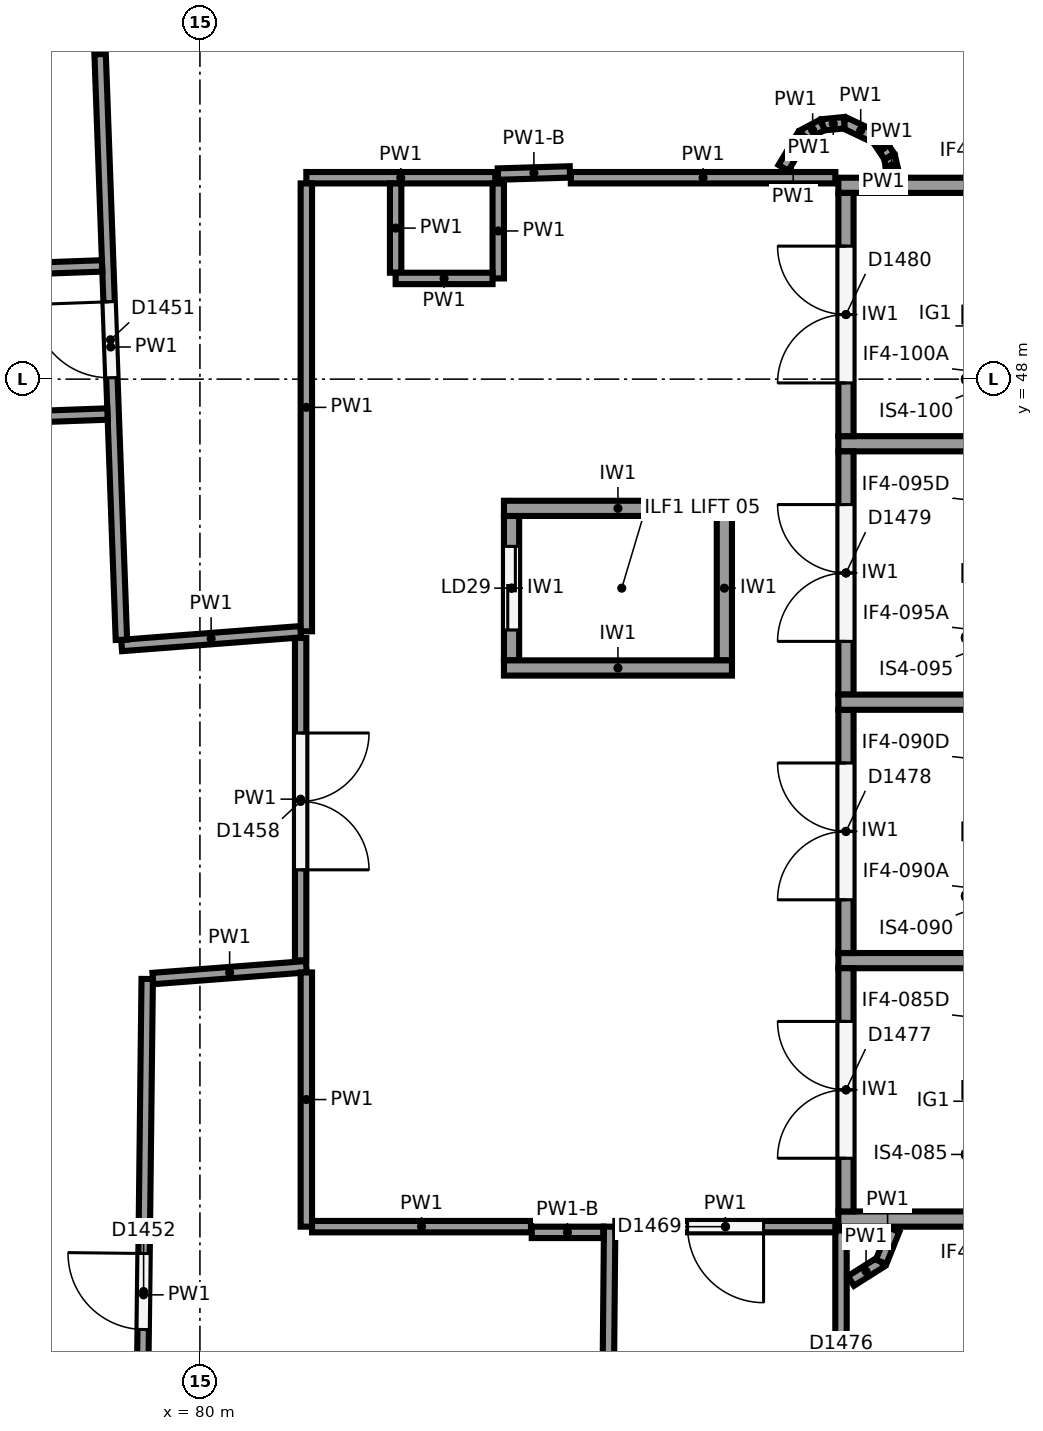
"""IFC4 building model, lengths in metres.
Left out: names, types, materials, properties, quantities, classifications, styles, units other than length and angle.
Written with IfcOpenShell. Run it as: python <this file> out.ifc"""

import sys

from ifc_helpers import new_model, si_unit, direction, frame, frame_2d, origin, origin_2d, place, context, subcontext, project, spatial, rectangle, circle, extrude, element, fill, save


model = new_model("IFC4")
c1 = context("Model", 3, precision=1e-05, world=origin(), true_north=direction((0.0, 1.0)))
c2 = subcontext(c1, "Body", "Model", "MODEL_VIEW")
j1 = project(units=[si_unit("LENGTHUNIT", "METRE"), si_unit("PLANEANGLEUNIT", "RADIAN")], contexts=[c1])
p1 = place(None, origin())
s1 = spatial("IfcSite", under=j1, at=p1, CompositionType="ELEMENT")
p2 = place(p1, origin())
s2 = spatial("IfcBuilding", under=s1, at=p2, CompositionType="ELEMENT")
p3 = place(p2, frame((0.0, 0.0, 18.0)))
s3 = spatial("IfcBuildingStorey", under=s2, at=p3, CompositionType="ELEMENT", Elevation=18.0)
p4 = place(p3, frame((84.884, 42.562, 0.0), z_axis=(0.0, 0.0, 1.0), x_axis=(1.0, 0.0, 0.0)))
e1 = element("IfcColumn", 1, at=p4, inside=s3, PredefinedType="COLUMN", context=c2, shape_type="SweptSolid", body=[
    extrude(circle(Radius=0.6, at=origin_2d()), origin(), (0.0, 0.0, 1.0), 6.0),
])
for number, where, z_axis, x_axis in (
    (2, (97.2, 36.95, 0.0), (0.0, 0.0, 1.0), (-1.0, 0.0, 0.0)),
    (3, (97.2, 43.75, 0.0), (0.0, 0.0, 1.0), (-1.0, 0.0, 0.0)),
    (4, (97.2, 50.55, 0.0), (0.0, 0.0, 1.0), (-1.0, 0.0, 0.0)),
    (5, (97.2, 40.35, 0.0), (0.0, 0.0, 1.0), (-1.0, 0.0, 0.0)),
    (6, (97.2, 47.15, 0.0), (0.0, 0.0, 1.0), (-1.0, 0.0, 0.0)),
):
    element("IfcWall", number, at=place(p3, frame(where, z_axis=z_axis, x_axis=x_axis)), inside=s3, PredefinedType="SHEAR", context=c2, shape_type="SweptSolid", body=[
        extrude(rectangle(XDim=8.8, YDim=0.2, at=frame_2d((4.4, 0.0))), origin(), (0.0, 0.0, 1.0), 5.6),
    ])
p5 = place(p3, frame((88.5, 37.05, 0.0), z_axis=(0.0, 0.0, 1.0), x_axis=(0.0, 1.0, 0.0)))
e7 = element("IfcWall", 7, at=p5, inside=s3, PredefinedType="SHEAR", context=c2, shape_type="SweptSolid", body=[
    extrude(rectangle(XDim=3.2, YDim=0.2, at=frame_2d((1.6, 0.0))), origin(), (0.0, 0.0, 1.0), 5.6),
])
p6 = place(p5, frame((0.7, 0.0, 0.0)))
e8 = element("IfcOpeningElement", 8, at=p6, cuts=e7, PredefinedType="OPENING", context=c2, shape_type="SweptSolid", body=[
    extrude(rectangle(XDim=1.8, YDim=2.1, at=frame_2d((0.9, 1.05))), frame((0.0, 0.11, 0.0), z_axis=(0.0, -1.0, 0.0), x_axis=(1.0, 0.0, 0.0)), (0.0, 0.0, 1.0), 0.22),
])
p7 = place(p3, frame((88.5, 40.45, 0.0), z_axis=(0.0, 0.0, 1.0), x_axis=(0.0, 1.0, 0.0)))
e9 = element("IfcWall", 9, at=p7, inside=s3, PredefinedType="SHEAR", context=c2, shape_type="SweptSolid", body=[
    extrude(rectangle(XDim=3.2, YDim=0.2, at=frame_2d((1.6, 0.0))), origin(), (0.0, 0.0, 1.0), 5.6),
])
p8 = place(p7, frame((0.7, 0.0, 0.0)))
e10 = element("IfcOpeningElement", 10, at=p8, cuts=e9, PredefinedType="OPENING", context=c2, shape_type="SweptSolid", body=[
    extrude(rectangle(XDim=1.8, YDim=2.1, at=frame_2d((0.9, 1.05))), frame((0.0, 0.11, 0.0), z_axis=(0.0, -1.0, 0.0), x_axis=(1.0, 0.0, 0.0)), (0.0, 0.0, 1.0), 0.22),
])
p9 = place(p3, frame((88.5, 43.85, 0.0), z_axis=(0.0, 0.0, 1.0), x_axis=(0.0, 1.0, 0.0)))
e11 = element("IfcWall", 11, at=p9, inside=s3, PredefinedType="SHEAR", context=c2, shape_type="SweptSolid", body=[
    extrude(rectangle(XDim=3.2, YDim=0.2, at=frame_2d((1.6, 0.0))), origin(), (0.0, 0.0, 1.0), 5.6),
])
p10 = place(p9, frame((0.7, 0.0, 0.0)))
e12 = element("IfcOpeningElement", 12, at=p10, cuts=e11, PredefinedType="OPENING", context=c2, shape_type="SweptSolid", body=[
    extrude(rectangle(XDim=1.8, YDim=2.1, at=frame_2d((0.9, 1.05))), frame((0.0, 0.11, 0.0), z_axis=(0.0, -1.0, 0.0), x_axis=(1.0, 0.0, 0.0)), (0.0, 0.0, 1.0), 0.22),
])
p11 = place(p3, frame((88.5, 47.25, 0.0), z_axis=(0.0, 0.0, 1.0), x_axis=(0.0, 1.0, 0.0)))
e13 = element("IfcWall", 13, at=p11, inside=s3, PredefinedType="SHEAR", context=c2, shape_type="SweptSolid", body=[
    extrude(rectangle(XDim=3.2, YDim=0.2, at=frame_2d((1.6, 0.0))), origin(), (0.0, 0.0, 1.0), 5.6),
])
p12 = place(p11, frame((0.7, 0.0, 0.0)))
e14 = element("IfcOpeningElement", 14, at=p12, cuts=e13, PredefinedType="OPENING", context=c2, shape_type="SweptSolid", body=[
    extrude(rectangle(XDim=1.8, YDim=2.1, at=frame_2d((0.9, 1.05))), frame((0.0, 0.11, 0.0), z_axis=(0.0, -1.0, 0.0), x_axis=(1.0, 0.0, 0.0)), (0.0, 0.0, 1.0), 0.22),
])
for number, where, z_axis, x_axis in (
    (15, (87.0, 44.2, 0.0), (0.0, 0.0, 1.0), (-1.0, 0.0, 0.0)),
    (16, (87.0, 46.3, 0.0), (0.0, 0.0, 1.0), (-1.0, 0.0, 0.0)),
):
    element("IfcWall", number, at=place(p3, frame(where, z_axis=z_axis, x_axis=x_axis)), inside=s3, PredefinedType="SHEAR", context=c2, shape_type="SweptSolid", body=[
        extrude(rectangle(XDim=3.0, YDim=0.2, at=frame_2d((1.5, 0.0))), origin(), (0.0, 0.0, 1.0), 5.6),
    ])
p13 = place(p3, frame((86.9, 44.3, 0.0), z_axis=(0.0, 0.0, 1.0), x_axis=(0.0, 1.0, 0.0)))
e17 = element("IfcWall", 17, at=p13, inside=s3, PredefinedType="SHEAR", context=c2, shape_type="SweptSolid", body=[
    extrude(rectangle(XDim=1.9, YDim=0.2, at=frame_2d((0.95, 0.0))), origin(), (0.0, 0.0, 1.0), 5.6),
])
p14 = place(p3, frame((84.1, 44.3, 0.0), z_axis=(0.0, 0.0, 1.0), x_axis=(0.0, 1.0, 0.0)))
e18 = element("IfcWall", 18, at=p14, inside=s3, PredefinedType="SHEAR", context=c2, shape_type="SweptSolid", body=[
    extrude(rectangle(XDim=1.9, YDim=0.2, at=frame_2d((0.95, 0.0))), origin(), (0.0, 0.0, 1.0), 5.6),
])
p15 = place(p14, frame((0.4, 0.0, 0.0)))
e19 = element("IfcOpeningElement", 19, at=p15, cuts=e18, PredefinedType="OPENING", context=c2, shape_type="SweptSolid", body=[
    extrude(rectangle(XDim=1.1, YDim=2.1, at=frame_2d((0.55, 1.05))), frame((0.0, 0.11, 0.0), z_axis=(0.0, -1.0, 0.0), x_axis=(1.0, 0.0, 0.0)), (0.0, 0.0, 1.0), 0.22),
])
p16 = place(p3, frame((88.435, 32.303, 0.0), z_axis=(0.0, 0.0, 1.0), x_axis=(0.0, 1.0, 0.0)))
e20 = element("IfcWall", 20, at=p16, inside=s3, PredefinedType="PARTITIONING", context=c2, shape_type="SweptSolid", body=[
    extrude(rectangle(XDim=4.497, YDim=0.15, at=frame_2d((2.249, 0.0))), origin(), (0.0, 0.0, 1.0), 5.6),
])
p17 = place(p16, frame((1.7, 0.0, 0.0)))
e21 = element("IfcOpeningElement", 21, at=p17, cuts=e20, PredefinedType="OPENING", context=c2, shape_type="SweptSolid", body=[
    extrude(rectangle(XDim=1.0, YDim=2.1, at=frame_2d((0.5, 1.05))), frame((0.0, 0.085, 0.0), z_axis=(0.0, -1.0, 0.0), x_axis=(1.0, 0.0, 0.0)), (0.0, 0.0, 1.0), 0.17),
])
p18 = place(p3, frame((85.346, 32.134, 0.0), z_axis=(0.0, 0.0, 1.0), x_axis=(0.009420359449, 0.999955627429, 0.0)))
e22 = element("IfcWall", 22, at=p18, inside=s3, PredefinedType="PARTITIONING", context=c2, shape_type="SweptSolid", body=[
    extrude(rectangle(XDim=4.717, YDim=0.15, at=frame_2d((2.358, 0.0))), origin(), (0.0, 0.0, 1.0), 5.6),
])
p19 = place(p3, frame((85.466, 36.85, 0.0), z_axis=(0.0, 0.0, 1.0), x_axis=(1.0, 0.0, 0.0)))
e23 = element("IfcWall", 23, at=p19, inside=s3, PredefinedType="PARTITIONING", context=c2, shape_type="SweptSolid", body=[
    extrude(rectangle(XDim=2.894, YDim=0.15, at=frame_2d((1.447, 0.0))), origin(), (0.0, 0.0, 1.0), 5.6),
])
p20 = place(p19, frame((0.95, 0.0, 0.0)))
e24 = element("IfcOpeningElement", 24, at=p20, cuts=e23, PredefinedType="OPENING", context=c2, shape_type="SweptSolid", body=[
    extrude(rectangle(XDim=1.0, YDim=2.1, at=frame_2d((0.5, 1.05))), frame((0.0, 0.085, 0.0), z_axis=(0.0, -1.0, 0.0), x_axis=(1.0, 0.0, 0.0)), (0.0, 0.0, 1.0), 0.17),
])
p21 = place(p3, frame((79.211, 31.797, 0.0), z_axis=(0.0, 0.0, 1.0), x_axis=(0.011484716768, 0.999934048466, 0.0)))
e25 = element("IfcWall", 25, at=p21, inside=s3, PredefinedType="PARTITIONING", context=c2, shape_type="SweptSolid", body=[
    extrude(rectangle(XDim=8.312, YDim=0.15, at=frame_2d((4.156, 0.0))), origin(), (0.0, 0.0, 1.0), 5.6),
])
p22 = place(p21, frame((3.7, 0.0, 0.0)))
e26 = element("IfcOpeningElement", 26, at=p22, cuts=e25, PredefinedType="OPENING", context=c2, shape_type="SweptSolid", body=[
    extrude(rectangle(XDim=1.0, YDim=2.1, at=frame_2d((0.5, 1.05))), frame((0.0, 0.085, 0.0), z_axis=(0.0, -1.0, 0.0), x_axis=(1.0, 0.0, 0.0)), (0.0, 0.0, 1.0), 0.17),
])
p23 = place(p3, frame((79.381, 40.115, 0.0), z_axis=(0.0, 0.0, 1.0), x_axis=(0.997072900492, 0.076456727009, 0.0)))
e27 = element("IfcWall", 27, at=p23, inside=s3, PredefinedType="PARTITIONING", context=c2, shape_type="SweptSolid", body=[
    extrude(rectangle(XDim=2.024, YDim=0.15, at=frame_2d((1.012, 0.0))), origin(), (0.0, 0.0, 1.0), 5.6),
])
p24 = place(p3, frame((81.4, 40.194, 0.0), z_axis=(0.0, 0.0, 1.0), x_axis=(0.0, -1.0, 0.0)))
e28 = element("IfcWall", 28, at=p24, inside=s3, PredefinedType="PARTITIONING", context=c2, shape_type="SweptSolid", body=[
    extrude(rectangle(XDim=3.344, YDim=0.15, at=frame_2d((1.672, 0.0))), origin(), (0.0, 0.0, 1.0), 5.6),
])
p25 = place(p3, frame((81.475, 36.85, 0.0), z_axis=(0.0, 0.0, 1.0), x_axis=(1.0, 0.0, 0.0)))
e29 = element("IfcWall", 29, at=p25, inside=s3, PredefinedType="PARTITIONING", context=c2, shape_type="SweptSolid", body=[
    extrude(rectangle(XDim=2.881, YDim=0.15, at=frame_2d((1.44, 0.0))), origin(), (0.0, 0.0, 1.0), 5.6),
])
p26 = place(p3, frame((88.36, 50.65, 0.0), z_axis=(0.0, 0.0, 1.0), x_axis=(-1.0, 0.0, 0.0)))
e30 = element("IfcWall", 30, at=p26, inside=s3, PredefinedType="PARTITIONING", context=c2, shape_type="SweptSolid", body=[
    extrude(rectangle(XDim=3.48, YDim=0.15, at=frame_2d((1.74, 0.0))), origin(), (0.0, 0.0, 1.0), 5.6),
])
p27 = place(p3, frame((83.886, 50.65, 0.0), z_axis=(0.0, 0.0, 1.0), x_axis=(-1.0, 0.0, 0.0)))
e31 = element("IfcWall", 31, at=p27, inside=s3, PredefinedType="PARTITIONING", context=c2, shape_type="SweptSolid", body=[
    extrude(rectangle(XDim=2.486, YDim=0.15, at=frame_2d((1.243, 0.0))), origin(), (0.0, 0.0, 1.0), 5.6),
])
p28 = place(p3, frame((81.4, 50.575, 0.0), z_axis=(0.0, 0.0, 1.0), x_axis=(0.0, -1.0, 0.0)))
e32 = element("IfcWall", 32, at=p28, inside=s3, PredefinedType="PARTITIONING", context=c2, shape_type="SweptSolid", body=[
    extrude(rectangle(XDim=5.893, YDim=0.15, at=frame_2d((2.946, 0.0))), origin(), (0.0, 0.0, 1.0), 5.6),
])
p29 = place(p3, frame((81.325, 44.677, 0.0), z_axis=(0.0, 0.0, 1.0), x_axis=(-0.997071482458, -0.076475217353, 0.0)))
e33 = element("IfcWall", 33, at=p29, inside=s3, PredefinedType="PARTITIONING", context=c2, shape_type="SweptSolid", body=[
    extrude(rectangle(XDim=2.362, YDim=0.15, at=frame_2d((1.181, 0.0))), origin(), (0.0, 0.0, 1.0), 5.6),
])
p30 = place(p3, frame((78.967, 44.571, 0.0), z_axis=(0.0, 0.0, 1.0), x_axis=(-0.036322942596, 0.999340104189, 0.0)))
e34 = element("IfcWall", 34, at=p30, inside=s3, PredefinedType="PARTITIONING", context=c2, shape_type="SweptSolid", body=[
    extrude(rectangle(XDim=7.709, YDim=0.15, at=frame_2d((3.855, 0.0))), origin(), (0.0, 0.0, 1.0), 5.6),
])
p31 = place(p30, frame((3.45, 0.0, 0.0)))
e35 = element("IfcOpeningElement", 35, at=p31, cuts=e34, PredefinedType="OPENING", context=c2, shape_type="SweptSolid", body=[
    extrude(rectangle(XDim=1.0, YDim=2.1, at=frame_2d((0.5, 1.05))), frame((0.0, 0.085, 0.0), z_axis=(0.0, -1.0, 0.0), x_axis=(1.0, 0.0, 0.0)), (0.0, 0.0, 1.0), 0.17),
])
p32 = place(p3, frame((83.925, 49.325, 0.0), z_axis=(0.0, 0.0, 1.0), x_axis=(0.0, 1.0, 0.0)))
e36 = element("IfcWall", 36, at=p32, inside=s3, PredefinedType="PARTITIONING", context=c2, shape_type="SweptSolid", body=[
    extrude(rectangle(XDim=1.249, YDim=0.15, at=frame_2d((0.625, 0.0))), origin(), (0.0, 0.0, 1.0), 5.6),
])
p33 = place(p3, frame((82.575, 50.574, 0.0), z_axis=(0.0, 0.0, 1.0), x_axis=(0.0, -1.0, 0.0)))
e37 = element("IfcWall", 37, at=p33, inside=s3, PredefinedType="PARTITIONING", context=c2, shape_type="SweptSolid", body=[
    extrude(rectangle(XDim=1.174, YDim=0.15, at=frame_2d((0.587, 0.0))), origin(), (0.0, 0.0, 1.0), 5.6),
])
p34 = place(p3, frame((82.575, 49.325, 0.0), z_axis=(0.0, 0.0, 1.0), x_axis=(1.0, 0.0, 0.0)))
e38 = element("IfcWall", 38, at=p34, inside=s3, PredefinedType="PARTITIONING", context=c2, shape_type="SweptSolid", body=[
    extrude(rectangle(XDim=1.275, YDim=0.15, at=frame_2d((0.638, 0.0))), origin(), (0.0, 0.0, 1.0), 5.6),
])
p35 = place(p3, frame((81.325, 44.594, 0.0), z_axis=(0.0, 0.0, 1.0), x_axis=(0.0, -1.0, 0.0)))
e39 = element("IfcWall", 39, at=p35, inside=s3, PredefinedType="PARTITIONING", context=c2, shape_type="SweptSolid", body=[
    extrude(rectangle(XDim=4.241, YDim=0.15, at=frame_2d((2.12, 0.0))), origin(), (0.0, 0.0, 1.0), 5.6),
])
p36 = place(p35, frame((1.25, 0.0, 0.0)))
e40 = element("IfcOpeningElement", 40, at=p36, cuts=e39, PredefinedType="OPENING", context=c2, shape_type="SweptSolid", body=[
    extrude(rectangle(XDim=1.8, YDim=2.1, at=frame_2d((0.9, 1.05))), frame((0.0, 0.085, 0.0), z_axis=(0.0, -1.0, 0.0), x_axis=(1.0, 0.0, 0.0)), (0.0, 0.0, 1.0), 0.17),
])
p37 = place(p3, frame((84.366, 36.775, 0.0), z_axis=(0.0, 0.0, 1.0), x_axis=(1.0, 0.0, 0.0)))
e41 = element("IfcWall", 41, at=p37, inside=s3, PredefinedType="PARTITIONING", context=c2, shape_type="SweptSolid", body=[
    extrude(rectangle(XDim=0.94, YDim=0.15, at=frame_2d((0.47, 0.0))), origin(), (0.0, 0.0, 1.0), 4.5),
])
p38 = place(p3, frame((88.566, 36.136, 0.0), z_axis=(0.0, 0.0, 1.0), x_axis=(0.845155463404, 0.534520572737, 0.0)))
e42 = element("IfcWall", 42, at=p38, inside=s3, PredefinedType="PARTITIONING", context=c2, shape_type="SweptSolid", body=[
    extrude(rectangle(XDim=0.47, YDim=0.15, at=frame_2d((0.235, 0.0))), origin(), (0.0, 0.0, 1.0), 5.6),
])
p39 = place(p3, frame((88.963, 36.387, 0.0), z_axis=(0.0, 0.0, 1.0), x_axis=(0.371761148228, 0.928328416385, 0.0)))
e43 = element("IfcWall", 43, at=p39, inside=s3, PredefinedType="PARTITIONING", context=c2, shape_type="SweptSolid", body=[
    extrude(rectangle(XDim=0.454, YDim=0.15, at=frame_2d((0.227, 0.0))), origin(), (0.0, 0.0, 1.0), 5.6),
])
p40 = place(p3, frame((89.13, 50.678, 0.0), z_axis=(0.0, 0.0, 1.0), x_axis=(-0.231150896285, 0.972917911823, 0.0)))
e44 = element("IfcWall", 44, at=p40, inside=s3, PredefinedType="PARTITIONING", context=c2, shape_type="SweptSolid", body=[
    extrude(rectangle(XDim=0.258, YDim=0.15, at=frame_2d((0.129, 0.0))), origin(), (0.0, 0.0, 1.0), 5.6),
])
p41 = place(p3, frame((89.07, 50.929, 0.0), z_axis=(0.0, 0.0, 1.0), x_axis=(-0.555678694372, 0.831397130511, 0.0)))
e45 = element("IfcWall", 45, at=p41, inside=s3, PredefinedType="PARTITIONING", context=c2, shape_type="SweptSolid", body=[
    extrude(rectangle(XDim=0.288, YDim=0.15, at=frame_2d((0.144, 0.0))), origin(), (0.0, 0.0, 1.0), 5.6),
])
p42 = place(p3, frame((88.91, 51.168, 0.0), z_axis=(0.0, 0.0, 1.0), x_axis=(-0.903893315025, 0.427757963167, 0.0)))
e46 = element("IfcWall", 46, at=p42, inside=s3, PredefinedType="PARTITIONING", context=c2, shape_type="SweptSolid", body=[
    extrude(rectangle(XDim=0.479, YDim=0.15, at=frame_2d((0.24, 0.0))), origin(), (0.0, 0.0, 1.0), 5.6),
])
for number, where, z_axis, x_axis in (
    (47, (88.477, 51.374, 0.0), (0.0, 0.0, 1.0), (-0.995, -0.098, 0.0)),
    (48, (88.189, 51.345, 0.0), (0.0, 0.0, 1.0), (-0.882, -0.472, 0.0)),
):
    element("IfcWall", number, at=place(p3, frame(where, z_axis=z_axis, x_axis=x_axis)), inside=s3, PredefinedType="PARTITIONING", context=c2, shape_type="SweptSolid", body=[
        extrude(rectangle(XDim=0.289, YDim=0.15, at=frame_2d((0.145, 0.0))), origin(), (0.0, 0.0, 1.0), 5.6),
    ])
p43 = place(p3, frame((87.934, 51.209, 0.0), z_axis=(0.0, 0.0, 1.0), x_axis=(-0.513060623194, -0.858352373404, 0.0)))
e49 = element("IfcWall", 49, at=p43, inside=s3, PredefinedType="PARTITIONING", context=c2, shape_type="SweptSolid", body=[
    extrude(rectangle(XDim=0.5, YDim=0.15, at=frame_2d((0.25, 0.0))), origin(), (0.0, 0.0, 1.0), 5.6),
])
p44 = place(p3, frame((84.868, 50.726, 0.0), z_axis=(0.0, 0.0, 1.0), x_axis=(-0.999545658695, -0.030140938677, 0.0)))
e50 = element("IfcWall", 50, at=p44, inside=s3, PredefinedType="PARTITIONING", context=c2, shape_type="SweptSolid", body=[
    extrude(rectangle(XDim=0.948, YDim=0.15, at=frame_2d((0.474, 0.0))), origin(), (0.0, 0.0, 1.0), 4.5),
])
p45 = place(p3, frame((78.784, 47.541, 0.0), z_axis=(0.0, 0.0, 1.0), x_axis=(-0.999343075339, -0.036241106098, 0.0)))
e51 = element("IfcWall", 51, at=p45, inside=s3, PredefinedType="PARTITIONING", context=c2, shape_type="SweptSolid", body=[
    extrude(rectangle(XDim=2.25, YDim=0.15, at=frame_2d((1.125, 0.0))), origin(), (0.0, 0.0, 1.0), 5.618),
])
p46 = place(p3, frame((78.713, 49.49, 0.0), z_axis=(0.0, 0.0, 1.0), x_axis=(-0.999343075339, -0.036241106098, 0.0)))
e52 = element("IfcWall", 52, at=p46, inside=s3, PredefinedType="PARTITIONING", context=c2, shape_type="SweptSolid", body=[
    extrude(rectangle(XDim=2.25, YDim=0.15, at=frame_2d((1.125, 0.0))), origin(), (0.0, 0.0, 1.0), 5.716),
])
p47 = place(p6, origin())
e53 = element("IfcDoor", 53, at=p47, inside=s3, OperationType="DOUBLE_DOOR_SINGLE_SWING", PredefinedType="DOOR", context=c2, shape_type="SweptSolid", body=[
    extrude(rectangle(XDim=1.8, YDim=2.1, at=frame_2d((0.9, 1.05))), frame((0.0, 0.025, 0.0), z_axis=(0.0, -1.0, 0.0), x_axis=(1.0, 0.0, 0.0)), (0.0, 0.0, 1.0), 0.05),
])
fill(e8, e53)
p48 = place(p8, origin())
e54 = element("IfcDoor", 54, at=p48, inside=s3, OperationType="DOUBLE_DOOR_SINGLE_SWING", PredefinedType="DOOR", context=c2, shape_type="SweptSolid", body=[
    extrude(rectangle(XDim=1.8, YDim=2.1, at=frame_2d((0.9, 1.05))), frame((0.0, 0.025, 0.0), z_axis=(0.0, -1.0, 0.0), x_axis=(1.0, 0.0, 0.0)), (0.0, 0.0, 1.0), 0.05),
])
fill(e10, e54)
p49 = place(p10, origin())
e55 = element("IfcDoor", 55, at=p49, inside=s3, OperationType="DOUBLE_DOOR_SINGLE_SWING", PredefinedType="DOOR", context=c2, shape_type="SweptSolid", body=[
    extrude(rectangle(XDim=1.8, YDim=2.1, at=frame_2d((0.9, 1.05))), frame((0.0, 0.025, 0.0), z_axis=(0.0, -1.0, 0.0), x_axis=(1.0, 0.0, 0.0)), (0.0, 0.0, 1.0), 0.05),
])
fill(e12, e55)
p50 = place(p12, origin())
e56 = element("IfcDoor", 56, at=p50, inside=s3, OperationType="DOUBLE_DOOR_SINGLE_SWING", PredefinedType="DOOR", context=c2, shape_type="SweptSolid", body=[
    extrude(rectangle(XDim=1.8, YDim=2.1, at=frame_2d((0.9, 1.05))), frame((0.0, 0.025, 0.0), z_axis=(0.0, -1.0, 0.0), x_axis=(1.0, 0.0, 0.0)), (0.0, 0.0, 1.0), 0.05),
])
fill(e14, e56)
p51 = place(p15, origin())
e57 = element("IfcDoor", 57, at=p51, inside=s3, OperationType="SLIDING_TO_LEFT", PredefinedType="DOOR", context=c2, shape_type="SweptSolid", body=[
    extrude(rectangle(XDim=1.1, YDim=2.1, at=frame_2d((0.55, 1.05))), frame((0.0, 0.025, 0.0), z_axis=(0.0, -1.0, 0.0), x_axis=(1.0, 0.0, 0.0)), (0.0, 0.0, 1.0), 0.05),
])
fill(e19, e57)
p52 = place(p20, frame((1.0, 0.0, 0.0), z_axis=(0.0, 0.0, 1.0), x_axis=(-1.0, 0.0, 0.0)))
e58 = element("IfcDoor", 58, at=p52, inside=s3, OperationType="SINGLE_SWING_LEFT", PredefinedType="DOOR", context=c2, shape_type="SweptSolid", body=[
    extrude(rectangle(XDim=1.0, YDim=2.1, at=frame_2d((0.5, 1.05))), frame((0.0, 0.025, 0.0), z_axis=(0.0, -1.0, 0.0), x_axis=(1.0, 0.0, 0.0)), (0.0, 0.0, 1.0), 0.05),
])
fill(e24, e58)
p53 = place(p22, origin())
e59 = element("IfcDoor", 59, at=p53, inside=s3, OperationType="SINGLE_SWING_RIGHT", PredefinedType="DOOR", context=c2, shape_type="SweptSolid", body=[
    extrude(rectangle(XDim=1.0, YDim=2.1, at=frame_2d((0.5, 1.05))), frame((0.0, 0.025, 0.0), z_axis=(0.0, -1.0, 0.0), x_axis=(1.0, 0.0, 0.0)), (0.0, 0.0, 1.0), 0.05),
])
fill(e26, e59)
p54 = place(p31, origin())
e60 = element("IfcDoor", 60, at=p54, inside=s3, OperationType="SINGLE_SWING_RIGHT", PredefinedType="DOOR", context=c2, shape_type="SweptSolid", body=[
    extrude(rectangle(XDim=1.0, YDim=2.1, at=frame_2d((0.5, 1.05))), frame((0.0, 0.025, 0.0), z_axis=(0.0, -1.0, 0.0), x_axis=(1.0, 0.0, 0.0)), (0.0, 0.0, 1.0), 0.05),
])
fill(e35, e60)
p55 = place(p36, origin())
e61 = element("IfcDoor", 61, at=p55, inside=s3, OperationType="DOUBLE_DOOR_SINGLE_SWING", PredefinedType="DOOR", context=c2, shape_type="SweptSolid", body=[
    extrude(rectangle(XDim=1.8, YDim=2.1, at=frame_2d((0.9, 1.05))), frame((0.0, 0.025, 0.0), z_axis=(0.0, -1.0, 0.0), x_axis=(1.0, 0.0, 0.0)), (0.0, 0.0, 1.0), 0.05),
])
fill(e40, e61)
save(model, sys.argv[1])
